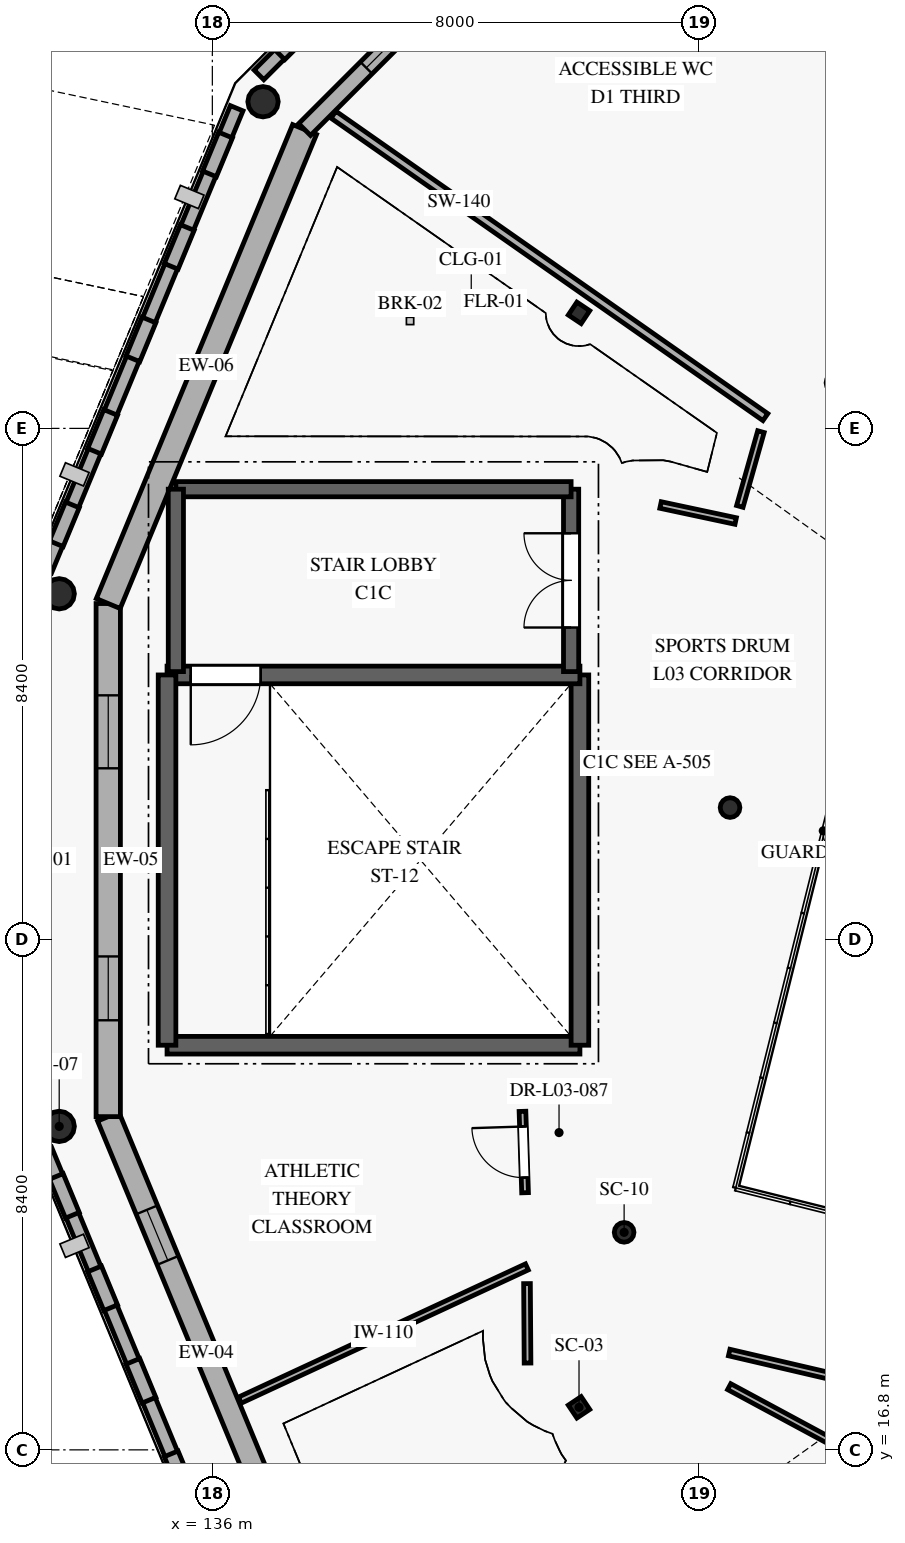
"""IFC4 building model, lengths in metres.
Left out: names, types, materials, properties, quantities, classifications, styles, units other than length and angle.
Written with IfcOpenShell. Run it as: python <this file> out.ifc"""

import sys

from ifc_helpers import new_model, si_unit, direction, frame, frame_2d, origin, origin_2d, place, context, subcontext, project, spatial, rectangle, circle, hollow_circle, i_section, extrude, element, fill, save


model = new_model("IFC4")
c1 = context("Model", 3, precision=1e-05, world=origin(), true_north=direction((0.0, 1.0)))
c2 = subcontext(c1, "Body", "Model", "MODEL_VIEW")
j1 = project(units=[si_unit("LENGTHUNIT", "METRE"), si_unit("PLANEANGLEUNIT", "RADIAN")], contexts=[c1])
p1 = place(None, origin())
s1 = spatial("IfcSite", under=j1, at=p1, CompositionType="ELEMENT")
p2 = place(p1, origin())
s2 = spatial("IfcBuilding", under=s1, at=p2, CompositionType="ELEMENT")
p3 = place(p2, frame((0.0, 0.0, 12.6)))
s3 = spatial("IfcBuildingStorey", under=s2, at=p3, CompositionType="ELEMENT", Elevation=12.6)
for number, where, z_axis, x_axis in (
    (1, (142.772, 20.377, 0.0), (0.0, 0.0, 1.0), (0.97, -0.242, 0.0)),
    (2, (144.514, 27.364, 0.0), (0.0, 0.0, 1.0), (0.97, -0.242, 0.0)),
):
    element("IfcColumn", number, at=place(p3, frame(where, z_axis=z_axis, x_axis=x_axis)), inside=s3, PredefinedType="COLUMN", context=c2, shape_type="SweptSolid", body=[
        extrude(hollow_circle(Radius=0.162, WallThickness=0.016, at=origin_2d()), origin(), (0.0, 0.0, 1.0), 4.2),
    ])
for number, where, z_axis, x_axis in (
    (3, (136.833, 38.973, 0.0), (0.0, 0.0, 1.0), (-0.556, -0.831, 0.0)),
    (4, (133.481, 30.88, 0.0), (0.0, 0.0, 1.0), (-0.195, -0.981, 0.0)),
    (5, (133.481, 22.12, 0.0), (0.0, 0.0, 1.0), (0.195, -0.981, 0.0)),
):
    element("IfcColumn", number, at=place(p3, frame(where, z_axis=z_axis, x_axis=x_axis)), inside=s3, PredefinedType="COLUMN", context=c2, shape_type="SweptSolid", body=[
        extrude(circle(Radius=0.25, at=origin_2d()), origin(), (0.0, 0.0, 1.0), 4.2),
    ])
for number, where, z_axis, x_axis in (
    (6, (142.03, 35.5, 0.0), (0.0, 0.0, 1.0), (-0.556, -0.831, 0.0)),
    (7, (142.03, 17.5, 0.0), (0.0, 0.0, 1.0), (0.556, -0.831, 0.0)),
):
    element("IfcColumn", number, at=place(p3, frame(where, z_axis=z_axis, x_axis=x_axis)), inside=s3, PredefinedType="COLUMN", context=c2, shape_type="SweptSolid", body=[
        extrude(i_section(OverallWidth=0.255, OverallDepth=0.254, WebThickness=0.009, FlangeThickness=0.014, FilletRadius=0.013, at=origin_2d()), origin(), (0.0, 0.0, 1.0), 4.2),
    ])
p4 = place(p3, frame((137.517, 14.484, 0.0), z_axis=(0.0, 0.0, 1.0), x_axis=(-0.382671186453, 0.923884604839, 0.0)))
e8 = element("IfcWall", 8, at=p4, inside=s3, PredefinedType="SOLIDWALL", context=c2, shape_type="SweptSolid", body=[
    extrude(rectangle(XDim=8.439, YDim=0.38, at=frame_2d((4.219, 0.0))), origin(), (0.0, 0.0, 1.0), 3.94),
])
p5 = place(p4, frame((0.35, 0.0, 0.85)))
e9 = element("IfcOpeningElement", 9, at=p5, cuts=e8, PredefinedType="OPENING", context=c2, shape_type="SweptSolid", body=[
    extrude(rectangle(XDim=0.85, YDim=1.4, at=frame_2d((0.425, 0.7))), frame((0.0, 0.2, 0.0), z_axis=(0.0, -1.0, 0.0), x_axis=(1.0, 0.0, 0.0)), (0.0, 0.0, 1.0), 0.4),
])
p6 = place(p4, frame((5.879, 0.0, 0.85)))
e10 = element("IfcOpeningElement", 10, at=p6, cuts=e8, PredefinedType="OPENING", context=c2, shape_type="SweptSolid", body=[
    extrude(rectangle(XDim=0.9, YDim=1.6, at=frame_2d((0.45, 0.8))), frame((0.0, 0.2, 0.0), z_axis=(0.0, -1.0, 0.0), x_axis=(1.0, 0.0, 0.0)), (0.0, 0.0, 1.0), 0.4),
])
p7 = place(p3, frame((134.288, 22.281, 0.0), z_axis=(0.0, 0.0, 1.0), x_axis=(0.0, 1.0, 0.0)))
e11 = element("IfcWall", 11, at=p7, inside=s3, PredefinedType="SOLIDWALL", context=c2, shape_type="SweptSolid", body=[
    extrude(rectangle(XDim=8.438, YDim=0.4, at=frame_2d((4.219, 0.0))), origin(), (0.0, 0.0, 1.0), 3.94),
])
p8 = place(p7, frame((1.585, 0.0, 0.85)))
e12 = element("IfcOpeningElement", 12, at=p8, cuts=e11, PredefinedType="OPENING", context=c2, shape_type="SweptSolid", body=[
    extrude(rectangle(XDim=1.05, YDim=1.6, at=frame_2d((0.525, 0.8))), frame((0.0, 0.21, 0.0), z_axis=(0.0, -1.0, 0.0), x_axis=(1.0, 0.0, 0.0)), (0.0, 0.0, 1.0), 0.42),
])
p9 = place(p7, frame((5.729, 0.0, 0.85)))
e13 = element("IfcOpeningElement", 13, at=p9, cuts=e11, PredefinedType="OPENING", context=c2, shape_type="SweptSolid", body=[
    extrude(rectangle(XDim=1.2, YDim=1.6, at=frame_2d((0.6, 0.8))), frame((0.0, 0.21, 0.0), z_axis=(0.0, -1.0, 0.0), x_axis=(1.0, 0.0, 0.0)), (0.0, 0.0, 1.0), 0.42),
])
p10 = place(p3, frame((134.288, 30.719, 0.0), z_axis=(0.0, 0.0, 1.0), x_axis=(0.382671186453, 0.923884604839, 0.0)))
e14 = element("IfcWall", 14, at=p10, inside=s3, PredefinedType="SOLIDWALL", context=c2, shape_type="SweptSolid", body=[
    extrude(rectangle(XDim=8.439, YDim=0.425, at=frame_2d((4.219, 0.0))), origin(), (0.0, 0.0, 1.0), 3.94),
])
p11 = place(p3, frame((137.517, 38.516, 0.0), z_axis=(0.0, 0.0, 1.0), x_axis=(0.707106781187, 0.707106781187, 0.0)))
e15 = element("IfcWall", 15, at=p11, inside=s3, PredefinedType="SOLIDWALL", context=c2, shape_type="SweptSolid", body=[
    extrude(rectangle(XDim=8.439, YDim=0.275, at=frame_2d((4.219, 0.0))), origin(), (0.0, 0.0, 1.0), 3.94),
])
p12 = place(p11, frame((1.435, 0.0, 0.85)))
e16 = element("IfcOpeningElement", 16, at=p12, cuts=e15, PredefinedType="OPENING", context=c2, shape_type="SweptSolid", body=[
    extrude(rectangle(XDim=1.35, YDim=1.6, at=frame_2d((0.675, 0.8))), frame((0.0, 0.147, 0.0), z_axis=(0.0, -1.0, 0.0), x_axis=(1.0, 0.0, 0.0)), (0.0, 0.0, 1.0), 0.295),
])
p13 = place(p11, frame((5.579, 0.0, 0.85)))
e17 = element("IfcOpeningElement", 17, at=p13, cuts=e15, PredefinedType="OPENING", context=c2, shape_type="SweptSolid", body=[
    extrude(rectangle(XDim=1.5, YDim=1.6, at=frame_2d((0.75, 0.8))), frame((0.0, 0.147, 0.0), z_axis=(0.0, -1.0, 0.0), x_axis=(1.0, 0.0, 0.0)), (0.0, 0.0, 1.0), 0.295),
])
p14 = place(p3, frame((142.585, 45.233, 0.0), z_axis=(0.0, 0.0, 1.0), x_axis=(-0.707106781187, -0.707106781187, 0.0)))
e18 = element("IfcWall", 18, at=p14, inside=s3, PredefinedType="ELEMENTEDWALL", context=c2, shape_type="SweptSolid", body=[
    extrude(rectangle(XDim=8.229, YDim=0.225, at=frame_2d((4.115, 0.0))), origin(), (0.0, 0.0, 1.0), 1.09),
])
p15 = place(p3, frame((137.593, 40.24, 1.09), z_axis=(0.0, 0.0, 1.0), x_axis=(-0.707283403329, -0.706930114916, 0.0)))
e19 = element("IfcWall", 19, at=p15, inside=s3, PredefinedType="ELEMENTEDWALL", context=c2, shape_type="SweptSolid", body=[
    extrude(rectangle(XDim=0.691, YDim=0.245, at=frame_2d((0.346, 0.0))), origin(), (0.0, 0.0, 1.0), 2.85),
])
p16 = place(p3, frame((136.4, 38.865, 0.0), z_axis=(0.0, 0.0, 1.0), x_axis=(-0.382687155267, -0.923877990426, 0.0)))
e20 = element("IfcWall", 20, at=p16, inside=s3, PredefinedType="ELEMENTEDWALL", context=c2, shape_type="SweptSolid", body=[
    extrude(rectangle(XDim=8.23, YDim=0.225, at=frame_2d((4.115, 0.0))), origin(), (0.0, 0.0, 1.0), 1.09),
])
for number, where, z_axis, x_axis in (
    (21, (136.217, 38.424, 1.09), (0.0, 0.0, 1.0), (-0.383, -0.924, 0.0)),
    (22, (135.587, 36.904, 1.09), (0.0, 0.0, 1.0), (-0.383, -0.924, 0.0)),
    (23, (134.958, 35.383, 1.09), (0.0, 0.0, 1.0), (-0.383, -0.924, 0.0)),
):
    element("IfcWall", number, at=place(p3, frame(where, z_axis=z_axis, x_axis=x_axis)), inside=s3, PredefinedType="ELEMENTEDWALL", context=c2, shape_type="SweptSolid", body=[
        extrude(rectangle(XDim=0.691, YDim=0.245, at=frame_2d((0.345, 0.0))), origin(), (0.0, 0.0, 1.0), 2.85),
    ])
p17 = place(p3, frame((134.328, 33.862, 1.09), z_axis=(0.0, 0.0, 1.0), x_axis=(-0.382757564877, -0.923848822335, 0.0)))
e24 = element("IfcWall", 24, at=p17, inside=s3, PredefinedType="ELEMENTEDWALL", context=c2, shape_type="SweptSolid", body=[
    extrude(rectangle(XDim=0.691, YDim=0.245, at=frame_2d((0.345, 0.0))), origin(), (0.0, 0.0, 1.0), 2.85),
])
p18 = place(p3, frame((133.698, 32.342, 1.09), z_axis=(0.0, 0.0, 1.0), x_axis=(-0.382934147939, -0.92377564286, 0.0)))
e25 = element("IfcWall", 25, at=p18, inside=s3, PredefinedType="ELEMENTEDWALL", context=c2, shape_type="SweptSolid", body=[
    extrude(rectangle(XDim=0.691, YDim=0.245, at=frame_2d((0.346, 0.0))), origin(), (0.0, 0.0, 1.0), 2.85),
])
p19 = place(p3, frame((133.251, 21.738, 0.0), z_axis=(0.0, 0.0, 1.0), x_axis=(0.382687155267, -0.923877990426, 0.0)))
e26 = element("IfcWall", 26, at=p19, inside=s3, PredefinedType="ELEMENTEDWALL", context=c2, shape_type="SweptSolid", body=[
    extrude(rectangle(XDim=8.23, YDim=0.225, at=frame_2d((4.115, 0.0))), origin(), (0.0, 0.0, 1.0), 1.09),
])
p20 = place(p3, frame((133.433, 21.297, 1.09), z_axis=(0.0, 0.0, 1.0), x_axis=(0.382934147939, -0.92377564286, 0.0)))
e27 = element("IfcWall", 27, at=p20, inside=s3, PredefinedType="ELEMENTEDWALL", context=c2, shape_type="SweptSolid", body=[
    extrude(rectangle(XDim=0.691, YDim=0.245, at=frame_2d((0.346, 0.0))), origin(), (0.0, 0.0, 1.0), 2.85),
])
p21 = place(p3, frame((134.063, 19.776, 1.09), z_axis=(0.0, 0.0, 1.0), x_axis=(0.382757564877, -0.923848822335, 0.0)))
e28 = element("IfcWall", 28, at=p21, inside=s3, PredefinedType="ELEMENTEDWALL", context=c2, shape_type="SweptSolid", body=[
    extrude(rectangle(XDim=0.691, YDim=0.245, at=frame_2d((0.345, 0.0))), origin(), (0.0, 0.0, 1.0), 2.85),
])
for number, where, z_axis, x_axis in (
    (29, (134.693, 18.255, 1.09), (0.0, 0.0, 1.0), (0.383, -0.924, 0.0)),
    (30, (135.323, 16.735, 1.09), (0.0, 0.0, 1.0), (0.383, -0.924, 0.0)),
):
    element("IfcWall", number, at=place(p3, frame(where, z_axis=z_axis, x_axis=x_axis)), inside=s3, PredefinedType="ELEMENTEDWALL", context=c2, shape_type="SweptSolid", body=[
        extrude(rectangle(XDim=0.691, YDim=0.245, at=frame_2d((0.345, 0.0))), origin(), (0.0, 0.0, 1.0), 2.85),
    ])
p22 = place(p3, frame((135.255, 23.455, 0.0), z_axis=(0.0, 0.0, 1.0), x_axis=(1.0, 0.0, 0.0)))
e31 = element("IfcWall", 31, at=p22, inside=s3, PredefinedType="SHEAR", context=c2, shape_type="SweptSolid", body=[
    extrude(rectangle(XDim=6.79, YDim=0.29, at=frame_2d((3.395, 0.0))), origin(), (0.0, 0.0, 1.0), 3.95),
])
p23 = place(p3, frame((142.045, 23.455, 0.0), z_axis=(0.0, 0.0, 1.0), x_axis=(0.0, 1.0, 0.0)))
e32 = element("IfcWall", 32, at=p23, inside=s3, PredefinedType="SHEAR", context=c2, shape_type="SweptSolid", body=[
    extrude(rectangle(XDim=6.09, YDim=0.29, at=frame_2d((3.045, 0.0))), origin(), (0.0, 0.0, 1.0), 3.95),
])
p24 = place(p3, frame((142.045, 29.545, 0.0), z_axis=(0.0, 0.0, 1.0), x_axis=(-1.0, 0.0, 0.0)))
e33 = element("IfcWall", 33, at=p24, inside=s3, PredefinedType="SHEAR", context=c2, shape_type="SweptSolid", body=[
    extrude(rectangle(XDim=6.79, YDim=0.29, at=frame_2d((3.395, 0.0))), origin(), (0.0, 0.0, 1.0), 3.95),
])
p25 = place(p24, frame((5.25, 0.0, 0.0)))
e34 = element("IfcOpeningElement", 34, at=p25, cuts=e33, PredefinedType="OPENING", context=c2, shape_type="SweptSolid", body=[
    extrude(rectangle(XDim=1.15, YDim=2.1, at=frame_2d((0.575, 1.05))), frame((0.0, 0.155, 0.0), z_axis=(0.0, -1.0, 0.0), x_axis=(1.0, 0.0, 0.0)), (0.0, 0.0, 1.0), 0.31),
])
p26 = place(p3, frame((135.255, 29.545, 0.0), z_axis=(0.0, 0.0, 1.0), x_axis=(0.0, -1.0, 0.0)))
e35 = element("IfcWall", 35, at=p26, inside=s3, PredefinedType="SHEAR", context=c2, shape_type="SweptSolid", body=[
    extrude(rectangle(XDim=6.09, YDim=0.29, at=frame_2d((3.045, 0.0))), origin(), (0.0, 0.0, 1.0), 3.95),
])
p27 = place(p3, frame((141.9, 29.6, 0.0), z_axis=(0.0, 0.0, 1.0), x_axis=(0.0, 1.0, 0.0)))
e36 = element("IfcWall", 36, at=p27, inside=s3, PredefinedType="SHEAR", context=c2, shape_type="SweptSolid", body=[
    extrude(rectangle(XDim=3.0, YDim=0.25, at=frame_2d((1.5, 0.0))), origin(), (0.0, 0.0, 1.0), 3.95),
])
p28 = place(p27, frame((0.725, 0.0, 0.0)))
e37 = element("IfcOpeningElement", 37, at=p28, cuts=e36, PredefinedType="OPENING", context=c2, shape_type="SweptSolid", body=[
    extrude(rectangle(XDim=1.55, YDim=2.15, at=frame_2d((0.775, 1.075))), frame((0.0, 0.135, 0.0), z_axis=(0.0, -1.0, 0.0), x_axis=(1.0, 0.0, 0.0)), (0.0, 0.0, 1.0), 0.27),
])
p29 = place(p3, frame((141.9, 32.6, 0.0), z_axis=(0.0, 0.0, 1.0), x_axis=(-1.0, 0.0, 0.0)))
e38 = element("IfcWall", 38, at=p29, inside=s3, PredefinedType="SHEAR", context=c2, shape_type="SweptSolid", body=[
    extrude(rectangle(XDim=6.5, YDim=0.25, at=frame_2d((3.25, 0.0))), origin(), (0.0, 0.0, 1.0), 3.95),
])
p30 = place(p3, frame((135.4, 32.6, 0.0), z_axis=(0.0, 0.0, 1.0), x_axis=(0.0, -1.0, 0.0)))
e39 = element("IfcWall", 39, at=p30, inside=s3, PredefinedType="SHEAR", context=c2, shape_type="SweptSolid", body=[
    extrude(rectangle(XDim=3.0, YDim=0.25, at=frame_2d((1.5, 0.0))), origin(), (0.0, 0.0, 1.0), 3.95),
])
p31 = place(p3, frame((141.173, 19.809, 0.0), z_axis=(0.0, 0.0, 1.0), x_axis=(-0.90703456181, -0.421056176397, 0.0)))
e40 = element("IfcWall", 40, at=p31, inside=s3, PredefinedType="PARTITIONING", context=c2, shape_type="SweptSolid", body=[
    extrude(rectangle(XDim=5.205, YDim=0.11, at=frame_2d((2.602, 0.0))), origin(), (0.0, 0.0, 1.0), 3.95),
])
p32 = place(p3, frame((149.724, 17.183, 0.0), z_axis=(0.0, 0.0, 1.0), x_axis=(-0.973885509314, 0.227039676596, 0.0)))
e41 = element("IfcWall", 41, at=p32, inside=s3, PredefinedType="PARTITIONING", context=c2, shape_type="SweptSolid", body=[
    extrude(rectangle(XDim=5.364, YDim=0.11, at=frame_2d((2.682, 0.0))), origin(), (0.0, 0.0, 1.0), 3.95),
])
p33 = place(p3, frame((144.5, 17.84, 0.0), z_axis=(0.0, 0.0, 1.0), x_axis=(0.880350401945, -0.474323908101, 0.0)))
e42 = element("IfcWall", 42, at=p33, inside=s3, PredefinedType="PARTITIONING", context=c2, shape_type="SweptSolid", body=[
    extrude(rectangle(XDim=7.471, YDim=0.11, at=frame_2d((3.735, 0.0))), origin(), (0.0, 0.0, 1.0), 3.95),
])
p34 = place(p33, frame((3.236, 0.0, 0.0)))
e43 = element("IfcOpeningElement", 43, at=p34, cuts=e42, PredefinedType="OPENING", context=c2, shape_type="SweptSolid", body=[
    extrude(rectangle(XDim=1.0, YDim=2.1, at=frame_2d((0.5, 1.05))), frame((0.0, 0.065, 0.0), z_axis=(0.0, -1.0, 0.0), x_axis=(1.0, 0.0, 0.0)), (0.0, 0.0, 1.0), 0.13),
])
p35 = place(p3, frame((141.184, 18.228, 0.0), z_axis=(0.0, 0.0, 1.0), x_axis=(-0.006727562196, 0.999977369697, 0.0)))
e44 = element("IfcWall", 44, at=p35, inside=s3, PredefinedType="PARTITIONING", context=c2, shape_type="SweptSolid", body=[
    extrude(rectangle(XDim=1.306, YDim=0.11, at=frame_2d((0.653, 0.0))), origin(), (0.0, 0.0, 1.0), 3.95),
])
p36 = place(p3, frame((137.991, 38.76, 0.0), z_axis=(0.0, 0.0, 1.0), x_axis=(0.819151233973, -0.5735775936, 0.0)))
e45 = element("IfcWall", 45, at=p36, inside=s3, PredefinedType="PLUMBINGWALL", context=c2, shape_type="SweptSolid", body=[
    extrude(rectangle(XDim=8.672, YDim=0.14, at=frame_2d((4.336, 0.0))), origin(), (0.0, 0.0, 1.0), 3.94),
])
p37 = place(p3, frame((141.143, 21.029, 0.0), z_axis=(0.0, 0.0, 1.0), x_axis=(-0.032094386476, 0.999484842485, 0.0)))
e46 = element("IfcWall", 46, at=p37, inside=s3, PredefinedType="PARTITIONING", context=c2, shape_type="SweptSolid", body=[
    extrude(rectangle(XDim=1.339, YDim=0.11, at=frame_2d((0.669, 0.0))), origin(), (0.0, 0.0, 1.0), 3.95),
])
p38 = place(p37, frame((0.25, 0.0, 0.0)))
e47 = element("IfcOpeningElement", 47, at=p38, cuts=e46, PredefinedType="OPENING", context=c2, shape_type="SweptSolid", body=[
    extrude(rectangle(XDim=0.84, YDim=2.04, at=frame_2d((0.42, 1.02))), frame((0.0, 0.065, 0.0), z_axis=(0.0, -1.0, 0.0), x_axis=(1.0, 0.0, 0.0)), (0.0, 0.0, 1.0), 0.13),
])
p39 = place(p3, frame((143.371, 32.34, 0.0), z_axis=(0.0, 0.0, 1.0), x_axis=(0.977988631183, -0.208658182868, 0.0)))
e48 = element("IfcWall", 48, at=p39, inside=s3, PredefinedType="PARTITIONING", context=c2, shape_type="SweptSolid", body=[
    extrude(rectangle(XDim=1.264, YDim=0.11, at=frame_2d((0.632, 0.0))), origin(), (0.0, 0.0, 1.0), 3.95),
])
p40 = place(p3, frame((144.675, 32.317, 0.0), z_axis=(0.0, 0.0, 1.0), x_axis=(0.271591717188, 0.962412561823, 0.0)))
e49 = element("IfcWall", 49, at=p40, inside=s3, PredefinedType="PARTITIONING", context=c2, shape_type="SweptSolid", body=[
    extrude(rectangle(XDim=1.278, YDim=0.11, at=frame_2d((0.639, 0.0))), origin(), (0.0, 0.0, 1.0), 3.95),
])
p41 = place(p6, origin())
e50 = element("IfcWindow", 50, at=p41, inside=s3, PartitioningType="SINGLE_PANEL", PredefinedType="WINDOW", context=c2, shape_type="SweptSolid", body=[
    extrude(rectangle(XDim=0.9, YDim=1.6, at=frame_2d((0.45, 0.8))), frame((0.0, 0.03, 0.0), z_axis=(0.0, -1.0, 0.0), x_axis=(1.0, 0.0, 0.0)), (0.0, 0.0, 1.0), 0.06),
])
fill(e10, e50)
p42 = place(p8, origin())
e51 = element("IfcWindow", 51, at=p42, inside=s3, PartitioningType="SINGLE_PANEL", PredefinedType="WINDOW", context=c2, shape_type="SweptSolid", body=[
    extrude(rectangle(XDim=1.05, YDim=1.6, at=frame_2d((0.525, 0.8))), frame((0.0, 0.03, 0.0), z_axis=(0.0, -1.0, 0.0), x_axis=(1.0, 0.0, 0.0)), (0.0, 0.0, 1.0), 0.06),
])
fill(e12, e51)
p43 = place(p9, origin())
e52 = element("IfcWindow", 52, at=p43, inside=s3, PartitioningType="SINGLE_PANEL", PredefinedType="WINDOW", context=c2, shape_type="SweptSolid", body=[
    extrude(rectangle(XDim=1.2, YDim=1.6, at=frame_2d((0.6, 0.8))), frame((0.0, 0.03, 0.0), z_axis=(0.0, -1.0, 0.0), x_axis=(1.0, 0.0, 0.0)), (0.0, 0.0, 1.0), 0.06),
])
fill(e13, e52)
p44 = place(p12, origin())
e53 = element("IfcWindow", 53, at=p44, inside=s3, PartitioningType="SINGLE_PANEL", PredefinedType="WINDOW", context=c2, shape_type="SweptSolid", body=[
    extrude(rectangle(XDim=1.35, YDim=1.6, at=frame_2d((0.675, 0.8))), frame((0.0, 0.03, 0.0), z_axis=(0.0, -1.0, 0.0), x_axis=(1.0, 0.0, 0.0)), (0.0, 0.0, 1.0), 0.06),
])
fill(e16, e53)
p45 = place(p25, origin())
e54 = element("IfcDoor", 54, at=p45, inside=s3, OperationType="SINGLE_SWING_RIGHT", PredefinedType="DOOR", context=c2, shape_type="SweptSolid", body=[
    extrude(rectangle(XDim=1.15, YDim=2.1, at=frame_2d((0.575, 1.05))), frame((0.0, 0.025, 0.0), z_axis=(0.0, -1.0, 0.0), x_axis=(1.0, 0.0, 0.0)), (0.0, 0.0, 1.0), 0.05),
])
fill(e34, e54)
p46 = place(p28, origin())
e55 = element("IfcDoor", 55, at=p46, inside=s3, OperationType="DOUBLE_DOOR_SINGLE_SWING", PredefinedType="DOOR", context=c2, shape_type="SweptSolid", body=[
    extrude(rectangle(XDim=1.55, YDim=2.15, at=frame_2d((0.775, 1.075))), frame((0.0, 0.025, 0.0), z_axis=(0.0, -1.0, 0.0), x_axis=(1.0, 0.0, 0.0)), (0.0, 0.0, 1.0), 0.05),
])
fill(e37, e55)
p47 = place(p38, origin())
e56 = element("IfcDoor", 56, at=p47, inside=s3, OperationType="SINGLE_SWING_RIGHT", PredefinedType="DOOR", context=c2, shape_type="SweptSolid", body=[
    extrude(rectangle(XDim=0.84, YDim=2.04, at=frame_2d((0.42, 1.02))), frame((0.0, 0.025, 0.0), z_axis=(0.0, -1.0, 0.0), x_axis=(1.0, 0.0, 0.0)), (0.0, 0.0, 1.0), 0.05),
])
fill(e47, e56)
save(model, sys.argv[1])
